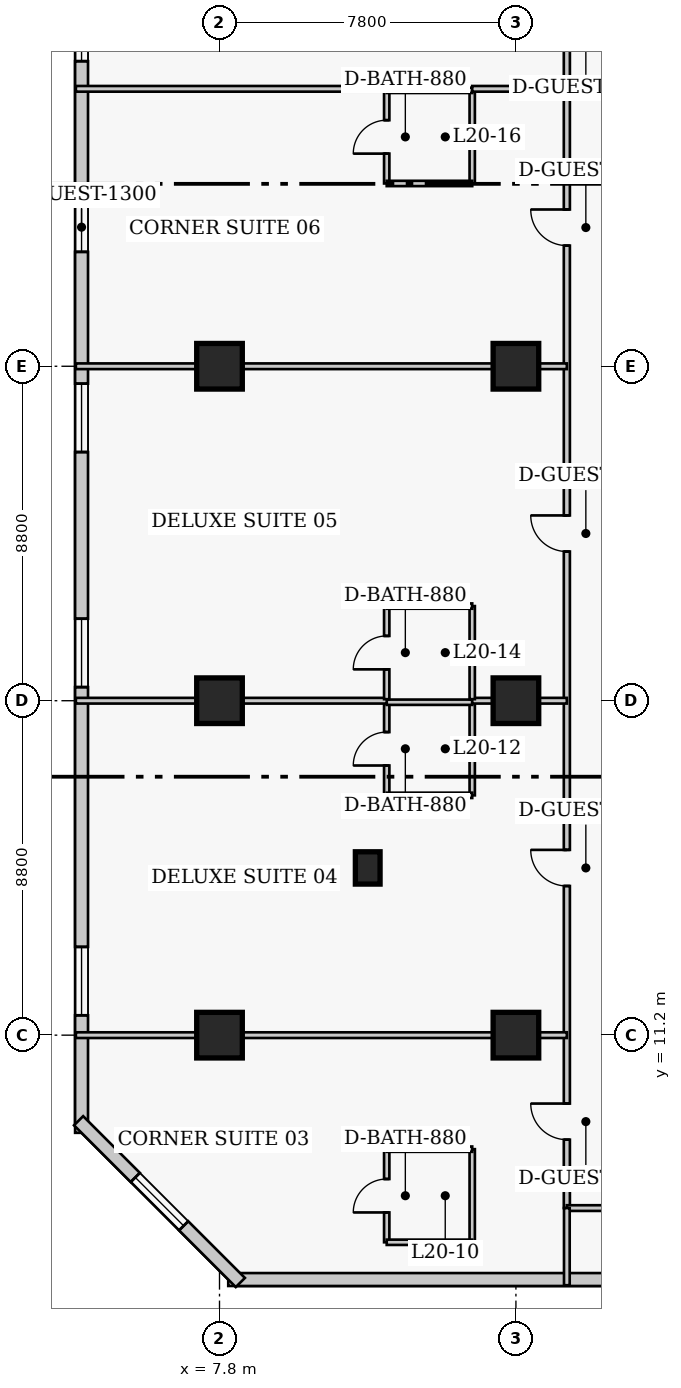
"""IFC4 building model, lengths in metres.
Left out: names, types, materials, properties, quantities, classifications, styles, units other than length and angle.
Written with IfcOpenShell. Run it as: python <this file> out.ifc"""

import sys

from ifc_helpers import new_model, si_unit, direction, frame, frame_2d, origin, origin_2d, place, context, subcontext, project, spatial, rectangle, extrude, element, fill, save


model = new_model("IFC4")
c1 = context("Model", 3, precision=1e-05, world=origin(), true_north=direction((0.0, 1.0)))
c2 = subcontext(c1, "Body", "Model", "MODEL_VIEW")
j1 = project(units=[si_unit("LENGTHUNIT", "METRE"), si_unit("PLANEANGLEUNIT", "RADIAN")], contexts=[c1])
p1 = place(None, origin())
s1 = spatial("IfcSite", under=j1, at=p1, CompositionType="ELEMENT")
p2 = place(p1, origin())
s2 = spatial("IfcBuilding", under=s1, at=p2, CompositionType="ELEMENT")
p3 = place(p2, frame((0.0, 0.0, 84.2)))
s3 = spatial("IfcBuildingStorey", under=s2, at=p3, CompositionType="ELEMENT", Elevation=84.2)
for number, where, z_axis, x_axis in (
    (1, (7.8, 11.2, 0.0), (0.0, 0.0, 1.0), (1.0, 0.0, 0.0)),
    (2, (7.8, 20.0, 0.0), (0.0, 0.0, 1.0), (1.0, 0.0, 0.0)),
    (3, (7.8, 28.8, 0.0), (0.0, 0.0, 1.0), (1.0, 0.0, 0.0)),
    (4, (15.6, 11.2, 0.0), (0.0, 0.0, 1.0), (1.0, 0.0, 0.0)),
    (5, (15.6, 20.0, 0.0), (0.0, 0.0, 1.0), (1.0, 0.0, 0.0)),
    (6, (15.6, 28.8, 0.0), (0.0, 0.0, 1.0), (1.0, 0.0, 0.0)),
):
    element("IfcColumn", number, at=place(p3, frame(where, z_axis=z_axis, x_axis=x_axis)), inside=s3, PredefinedType="COLUMN", context=c2, shape_type="SweptSolid", body=[
        extrude(rectangle(XDim=1.2, YDim=1.2, at=origin_2d()), origin(), (0.0, 0.0, 1.0), 3.8),
    ])
p4 = place(p3, frame((11.7, 15.6, 0.0), z_axis=(0.0, 0.0, 1.0), x_axis=(1.0, 0.0, 0.0)))
e7 = element("IfcColumn", 7, at=p4, inside=s3, PredefinedType="PILASTER", context=c2, shape_type="SweptSolid", body=[
    extrude(rectangle(XDim=0.65, YDim=0.85, at=origin_2d()), origin(), (0.0, 0.0, 1.0), 3.8),
])
p5 = place(p3, frame((8.03, 4.77, 0.0), z_axis=(0.0, 0.0, 1.0), x_axis=(1.0, 0.0, 0.0)))
e8 = element("IfcWall", 8, at=p5, inside=s3, PredefinedType="SOLIDWALL", context=c2, shape_type="SweptSolid", body=[
    extrude(rectangle(XDim=28.29, YDim=0.34, at=frame_2d((14.145, 0.0))), origin(), (0.0, 0.0, 1.0), 3.54),
])
p6 = place(p5, frame((12.595, 0.0, 0.85)))
e9 = element("IfcOpeningElement", 9, at=p6, cuts=e8, PredefinedType="OPENING", context=c2, shape_type="SweptSolid", body=[
    extrude(rectangle(XDim=1.8, YDim=1.8, at=frame_2d((0.9, 0.9))), frame((0.0, 0.18, 0.0), z_axis=(0.0, -1.0, 0.0), x_axis=(1.0, 0.0, 0.0)), (0.0, 0.0, 1.0), 0.36),
])
p7 = place(p3, frame((4.17, 40.57, 0.0), z_axis=(0.0, 0.0, 1.0), x_axis=(0.0, -1.0, 0.0)))
e10 = element("IfcWall", 10, at=p7, inside=s3, PredefinedType="SOLIDWALL", context=c2, shape_type="SweptSolid", body=[
    extrude(rectangle(XDim=31.94, YDim=0.34, at=frame_2d((15.97, 0.0))), origin(), (0.0, 0.0, 1.0), 3.54),
])
p8 = place(p7, frame((1.942, 0.0, 0.85)))
e11 = element("IfcOpeningElement", 11, at=p8, cuts=e10, PredefinedType="OPENING", context=c2, shape_type="SweptSolid", body=[
    extrude(rectangle(XDim=1.8, YDim=1.8, at=frame_2d((0.9, 0.9))), frame((0.0, 0.18, 0.0), z_axis=(0.0, -1.0, 0.0), x_axis=(1.0, 0.0, 0.0)), (0.0, 0.0, 1.0), 0.36),
])
p9 = place(p7, frame((12.228, 0.0, 0.85)))
e12 = element("IfcOpeningElement", 12, at=p9, cuts=e10, PredefinedType="OPENING", context=c2, shape_type="SweptSolid", body=[
    extrude(rectangle(XDim=1.8, YDim=1.8, at=frame_2d((0.9, 0.9))), frame((0.0, 0.18, 0.0), z_axis=(0.0, -1.0, 0.0), x_axis=(1.0, 0.0, 0.0)), (0.0, 0.0, 1.0), 0.36),
])
p10 = place(p7, frame((18.413, 0.0, 0.85)))
e13 = element("IfcOpeningElement", 13, at=p10, cuts=e10, PredefinedType="OPENING", context=c2, shape_type="SweptSolid", body=[
    extrude(rectangle(XDim=1.8, YDim=1.8, at=frame_2d((0.9, 0.9))), frame((0.0, 0.18, 0.0), z_axis=(0.0, -1.0, 0.0), x_axis=(1.0, 0.0, 0.0)), (0.0, 0.0, 1.0), 0.36),
])
p11 = place(p7, frame((27.048, 0.0, 0.85)))
e14 = element("IfcOpeningElement", 14, at=p11, cuts=e10, PredefinedType="OPENING", context=c2, shape_type="SweptSolid", body=[
    extrude(rectangle(XDim=1.8, YDim=1.8, at=frame_2d((0.9, 0.9))), frame((0.0, 0.18, 0.0), z_axis=(0.0, -1.0, 0.0), x_axis=(1.0, 0.0, 0.0)), (0.0, 0.0, 1.0), 0.36),
])
p12 = place(p7, frame((7.46, 0.0, 0.85)))
e15 = element("IfcOpeningElement", 15, at=p12, cuts=e10, PredefinedType="OPENING", context=c2, shape_type="SweptSolid", body=[
    extrude(rectangle(XDim=1.3, YDim=1.7, at=frame_2d((0.65, 0.85))), frame((0.0, 0.18, 0.0), z_axis=(0.0, -1.0, 0.0), x_axis=(1.0, 0.0, 0.0)), (0.0, 0.0, 1.0), 0.36),
])
p13 = place(p3, frame((4.092, 8.948, 0.0), z_axis=(0.0, 0.0, 1.0), x_axis=(0.707106781187, -0.707106781187, 0.0)))
e16 = element("IfcWall", 16, at=p13, inside=s3, PredefinedType="SOLIDWALL", context=c2, shape_type="SweptSolid", body=[
    extrude(rectangle(XDim=6.02, YDim=0.34, at=frame_2d((3.01, 0.0))), origin(), (0.0, 0.0, 1.0), 3.54),
])
p14 = place(p13, frame((2.11, 0.0, 0.85)))
e17 = element("IfcOpeningElement", 17, at=p14, cuts=e16, PredefinedType="OPENING", context=c2, shape_type="SweptSolid", body=[
    extrude(rectangle(XDim=1.8, YDim=1.8, at=frame_2d((0.9, 0.9))), frame((0.0, 0.18, 0.0), z_axis=(0.0, -1.0, 0.0), x_axis=(1.0, 0.0, 0.0)), (0.0, 0.0, 1.0), 0.36),
])
p15 = place(p3, frame((16.94, 6.65, 0.0), z_axis=(0.0, 0.0, 1.0), x_axis=(0.0, 1.0, 0.0)))
e18 = element("IfcWall", 18, at=p15, inside=s3, PredefinedType="PARTITIONING", context=c2, shape_type="SweptSolid", body=[
    extrude(rectangle(XDim=34.0, YDim=0.16, at=frame_2d((17.0, 0.0))), origin(), (0.0, 0.0, 1.0), 3.54),
])
p16 = place(p15, frame((1.8, 0.0, 0.0)))
e19 = element("IfcOpeningElement", 19, at=p16, cuts=e18, PredefinedType="OPENING", context=c2, shape_type="SweptSolid", body=[
    extrude(rectangle(XDim=0.95, YDim=2.1, at=frame_2d((0.475, 1.05))), frame((0.0, 0.09, 0.0), z_axis=(0.0, -1.0, 0.0), x_axis=(1.0, 0.0, 0.0)), (0.0, 0.0, 1.0), 0.18),
])
p17 = place(p15, frame((8.475, 0.0, 0.0)))
e20 = element("IfcOpeningElement", 20, at=p17, cuts=e18, PredefinedType="OPENING", context=c2, shape_type="SweptSolid", body=[
    extrude(rectangle(XDim=0.95, YDim=2.1, at=frame_2d((0.475, 1.05))), frame((0.0, 0.09, 0.0), z_axis=(0.0, -1.0, 0.0), x_axis=(1.0, 0.0, 0.0)), (0.0, 0.0, 1.0), 0.18),
])
p18 = place(p15, frame((17.275, 0.0, 0.0)))
e21 = element("IfcOpeningElement", 21, at=p18, cuts=e18, PredefinedType="OPENING", context=c2, shape_type="SweptSolid", body=[
    extrude(rectangle(XDim=0.95, YDim=2.1, at=frame_2d((0.475, 1.05))), frame((0.0, 0.09, 0.0), z_axis=(0.0, -1.0, 0.0), x_axis=(1.0, 0.0, 0.0)), (0.0, 0.0, 1.0), 0.18),
])
p19 = place(p15, frame((25.325, 0.0, 0.0)))
e22 = element("IfcOpeningElement", 22, at=p19, cuts=e18, PredefinedType="OPENING", context=c2, shape_type="SweptSolid", body=[
    extrude(rectangle(XDim=0.95, YDim=2.1, at=frame_2d((0.475, 1.05))), frame((0.0, 0.09, 0.0), z_axis=(0.0, -1.0, 0.0), x_axis=(1.0, 0.0, 0.0)), (0.0, 0.0, 1.0), 0.18),
])
p20 = place(p15, frame((32.56, 0.0, 0.0)))
e23 = element("IfcOpeningElement", 23, at=p20, cuts=e18, PredefinedType="OPENING", context=c2, shape_type="SweptSolid", body=[
    extrude(rectangle(XDim=1.0, YDim=2.15, at=frame_2d((0.5, 1.075))), frame((0.0, 0.09, 0.0), z_axis=(0.0, -1.0, 0.0), x_axis=(1.0, 0.0, 0.0)), (0.0, 0.0, 1.0), 0.18),
])
p21 = place(p3, frame((16.94, 6.65, 0.0), z_axis=(0.0, 0.0, 1.0), x_axis=(1.0, 0.0, 0.0)))
e24 = element("IfcWall", 24, at=p21, inside=s3, PredefinedType="PARTITIONING", context=c2, shape_type="SweptSolid", body=[
    extrude(rectangle(XDim=2.22, YDim=0.15, at=frame_2d((1.11, 0.0))), origin(), (0.0, 0.0, 1.0), 3.54),
])
p22 = place(p3, frame((16.94, 4.62, 0.0), z_axis=(0.0, 0.0, 1.0), x_axis=(0.0, 1.0, 0.0)))
e25 = element("IfcWall", 25, at=p22, inside=s3, PredefinedType="PARTITIONING", context=c2, shape_type="SweptSolid", body=[
    extrude(rectangle(XDim=2.03, YDim=0.15, at=frame_2d((1.015, 0.0))), origin(), (0.0, 0.0, 1.0), 3.54),
])
p23 = place(p3, frame((12.2, 5.75, 0.0), z_axis=(0.0, 0.0, 1.0), x_axis=(0.0, 1.0, 0.0)))
e26 = element("IfcWall", 26, at=p23, inside=s3, PredefinedType="PLUMBINGWALL", context=c2, shape_type="SweptSolid", body=[
    extrude(rectangle(XDim=2.45, YDim=0.14, at=frame_2d((1.225, 0.0))), origin(), (0.0, 0.0, 1.0), 3.54),
])
p24 = place(p23, frame((0.785, 0.0, 0.0)))
e27 = element("IfcOpeningElement", 27, at=p24, cuts=e26, PredefinedType="OPENING", context=c2, shape_type="SweptSolid", body=[
    extrude(rectangle(XDim=0.88, YDim=2.05, at=frame_2d((0.44, 1.025))), frame((0.0, 0.08, 0.0), z_axis=(0.0, -1.0, 0.0), x_axis=(1.0, 0.0, 0.0)), (0.0, 0.0, 1.0), 0.16),
])
p25 = place(p3, frame((14.45, 5.75, 0.0), z_axis=(0.0, 0.0, 1.0), x_axis=(0.0, 1.0, 0.0)))
e28 = element("IfcWall", 28, at=p25, inside=s3, PredefinedType="PLUMBINGWALL", context=c2, shape_type="SweptSolid", body=[
    extrude(rectangle(XDim=2.45, YDim=0.14, at=frame_2d((1.225, 0.0))), origin(), (0.0, 0.0, 1.0), 3.54),
])
for number, where, z_axis, x_axis in (
    (29, (12.2, 5.75, 0.0), (0.0, 0.0, 1.0), (1.0, 0.0, 0.0)),
    (30, (12.2, 8.2, 0.0), (0.0, 0.0, 1.0), (1.0, 0.0, 0.0)),
):
    element("IfcWall", number, at=place(p3, frame(where, z_axis=z_axis, x_axis=x_axis)), inside=s3, PredefinedType="PLUMBINGWALL", context=c2, shape_type="SweptSolid", body=[
        extrude(rectangle(XDim=2.25, YDim=0.14, at=frame_2d((1.125, 0.0))), origin(), (0.0, 0.0, 1.0), 3.54),
    ])
p26 = place(p3, frame((4.02, 11.2, 0.0), z_axis=(0.0, 0.0, 1.0), x_axis=(1.0, 0.0, 0.0)))
e31 = element("IfcWall", 31, at=p26, inside=s3, PredefinedType="PARTITIONING", context=c2, shape_type="SweptSolid", body=[
    extrude(rectangle(XDim=12.92, YDim=0.15, at=frame_2d((6.46, 0.0))), origin(), (0.0, 0.0, 1.0), 2.679),
])
p27 = place(p3, frame((12.2, 17.51, 0.0), z_axis=(0.0, 0.0, 1.0), x_axis=(0.0, 1.0, 0.0)))
e32 = element("IfcWall", 32, at=p27, inside=s3, PredefinedType="PLUMBINGWALL", context=c2, shape_type="SweptSolid", body=[
    extrude(rectangle(XDim=2.45, YDim=0.14, at=frame_2d((1.225, 0.0))), origin(), (0.0, 0.0, 1.0), 3.54),
])
p28 = place(p27, frame((0.785, 0.0, 0.0)))
e33 = element("IfcOpeningElement", 33, at=p28, cuts=e32, PredefinedType="OPENING", context=c2, shape_type="SweptSolid", body=[
    extrude(rectangle(XDim=0.88, YDim=2.05, at=frame_2d((0.44, 1.025))), frame((0.0, 0.08, 0.0), z_axis=(0.0, -1.0, 0.0), x_axis=(1.0, 0.0, 0.0)), (0.0, 0.0, 1.0), 0.16),
])
p29 = place(p3, frame((14.45, 17.51, 0.0), z_axis=(0.0, 0.0, 1.0), x_axis=(0.0, 1.0, 0.0)))
e34 = element("IfcWall", 34, at=p29, inside=s3, PredefinedType="PLUMBINGWALL", context=c2, shape_type="SweptSolid", body=[
    extrude(rectangle(XDim=2.45, YDim=0.14, at=frame_2d((1.225, 0.0))), origin(), (0.0, 0.0, 1.0), 3.54),
])
p30 = place(p3, frame((12.2, 17.51, 0.0), z_axis=(0.0, 0.0, 1.0), x_axis=(1.0, 0.0, 0.0)))
e35 = element("IfcWall", 35, at=p30, inside=s3, PredefinedType="PLUMBINGWALL", context=c2, shape_type="SweptSolid", body=[
    extrude(rectangle(XDim=2.25, YDim=0.14, at=frame_2d((1.125, 0.0))), origin(), (0.0, 0.0, 1.0), 3.54),
])
p31 = place(p3, frame((12.2, 19.96, 0.0), z_axis=(0.0, 0.0, 1.0), x_axis=(1.0, 0.0, 0.0)))
e36 = element("IfcWall", 36, at=p31, inside=s3, PredefinedType="PLUMBINGWALL", context=c2, shape_type="SweptSolid", body=[
    extrude(rectangle(XDim=2.25, YDim=0.14, at=frame_2d((1.125, 0.0))), origin(), (0.0, 0.0, 1.0), 2.679),
])
p32 = place(p3, frame((4.02, 20.0, 0.0), z_axis=(0.0, 0.0, 1.0), x_axis=(1.0, 0.0, 0.0)))
e37 = element("IfcWall", 37, at=p32, inside=s3, PredefinedType="PARTITIONING", context=c2, shape_type="SweptSolid", body=[
    extrude(rectangle(XDim=8.18, YDim=0.15, at=frame_2d((4.09, 0.0))), origin(), (0.0, 0.0, 1.0), 2.679),
])
p33 = place(p3, frame((14.45, 20.0, 0.0), z_axis=(0.0, 0.0, 1.0), x_axis=(1.0, 0.0, 0.0)))
e38 = element("IfcWall", 38, at=p33, inside=s3, PredefinedType="PARTITIONING", context=c2, shape_type="SweptSolid", body=[
    extrude(rectangle(XDim=2.49, YDim=0.15, at=frame_2d((1.245, 0.0))), origin(), (0.0, 0.0, 1.0), 2.679),
])
p34 = place(p3, frame((12.2, 20.04, 0.0), z_axis=(0.0, 0.0, 1.0), x_axis=(0.0, 1.0, 0.0)))
e39 = element("IfcWall", 39, at=p34, inside=s3, PredefinedType="PLUMBINGWALL", context=c2, shape_type="SweptSolid", body=[
    extrude(rectangle(XDim=2.45, YDim=0.14, at=frame_2d((1.225, 0.0))), origin(), (0.0, 0.0, 1.0), 3.54),
])
p35 = place(p34, frame((0.785, 0.0, 0.0)))
e40 = element("IfcOpeningElement", 40, at=p35, cuts=e39, PredefinedType="OPENING", context=c2, shape_type="SweptSolid", body=[
    extrude(rectangle(XDim=0.88, YDim=2.05, at=frame_2d((0.44, 1.025))), frame((0.0, 0.08, 0.0), z_axis=(0.0, -1.0, 0.0), x_axis=(1.0, 0.0, 0.0)), (0.0, 0.0, 1.0), 0.16),
])
p36 = place(p3, frame((14.45, 20.04, 0.0), z_axis=(0.0, 0.0, 1.0), x_axis=(0.0, 1.0, 0.0)))
e41 = element("IfcWall", 41, at=p36, inside=s3, PredefinedType="PLUMBINGWALL", context=c2, shape_type="SweptSolid", body=[
    extrude(rectangle(XDim=2.45, YDim=0.14, at=frame_2d((1.225, 0.0))), origin(), (0.0, 0.0, 1.0), 3.54),
])
p37 = place(p3, frame((12.2, 22.49, 0.0), z_axis=(0.0, 0.0, 1.0), x_axis=(1.0, 0.0, 0.0)))
e42 = element("IfcWall", 42, at=p37, inside=s3, PredefinedType="PLUMBINGWALL", context=c2, shape_type="SweptSolid", body=[
    extrude(rectangle(XDim=2.25, YDim=0.14, at=frame_2d((1.125, 0.0))), origin(), (0.0, 0.0, 1.0), 3.54),
])
p38 = place(p3, frame((4.02, 28.8, 0.0), z_axis=(0.0, 0.0, 1.0), x_axis=(1.0, 0.0, 0.0)))
e43 = element("IfcWall", 43, at=p38, inside=s3, PredefinedType="PARTITIONING", context=c2, shape_type="SweptSolid", body=[
    extrude(rectangle(XDim=12.92, YDim=0.15, at=frame_2d((6.46, 0.0))), origin(), (0.0, 0.0, 1.0), 2.679),
])
p39 = place(p3, frame((12.2, 33.61, 0.0), z_axis=(0.0, 0.0, 1.0), x_axis=(0.0, 1.0, 0.0)))
e44 = element("IfcWall", 44, at=p39, inside=s3, PredefinedType="PLUMBINGWALL", context=c2, shape_type="SweptSolid", body=[
    extrude(rectangle(XDim=2.45, YDim=0.14, at=frame_2d((1.225, 0.0))), origin(), (0.0, 0.0, 1.0), 3.54),
])
p40 = place(p39, frame((0.785, 0.0, 0.0)))
e45 = element("IfcOpeningElement", 45, at=p40, cuts=e44, PredefinedType="OPENING", context=c2, shape_type="SweptSolid", body=[
    extrude(rectangle(XDim=0.88, YDim=2.05, at=frame_2d((0.44, 1.025))), frame((0.0, 0.08, 0.0), z_axis=(0.0, -1.0, 0.0), x_axis=(1.0, 0.0, 0.0)), (0.0, 0.0, 1.0), 0.16),
])
p41 = place(p3, frame((14.45, 33.61, 0.0), z_axis=(0.0, 0.0, 1.0), x_axis=(0.0, 1.0, 0.0)))
e46 = element("IfcWall", 46, at=p41, inside=s3, PredefinedType="PLUMBINGWALL", context=c2, shape_type="SweptSolid", body=[
    extrude(rectangle(XDim=2.45, YDim=0.14, at=frame_2d((1.225, 0.0))), origin(), (0.0, 0.0, 1.0), 3.54),
])
for number, where, z_axis, x_axis in (
    (47, (12.2, 33.61, 0.0), (0.0, 0.0, 1.0), (1.0, 0.0, 0.0)),
    (48, (12.2, 36.06, 0.0), (0.0, 0.0, 1.0), (1.0, 0.0, 0.0)),
):
    element("IfcWall", number, at=place(p3, frame(where, z_axis=z_axis, x_axis=x_axis)), inside=s3, PredefinedType="PLUMBINGWALL", context=c2, shape_type="SweptSolid", body=[
        extrude(rectangle(XDim=2.25, YDim=0.14, at=frame_2d((1.125, 0.0))), origin(), (0.0, 0.0, 1.0), 3.54),
    ])
p42 = place(p3, frame((4.02, 36.1, 0.0), z_axis=(0.0, 0.0, 1.0), x_axis=(1.0, 0.0, 0.0)))
e49 = element("IfcWall", 49, at=p42, inside=s3, PredefinedType="PARTITIONING", context=c2, shape_type="SweptSolid", body=[
    extrude(rectangle(XDim=8.18, YDim=0.15, at=frame_2d((4.09, 0.0))), origin(), (0.0, 0.0, 1.0), 3.54),
])
p43 = place(p3, frame((14.45, 36.1, 0.0), z_axis=(0.0, 0.0, 1.0), x_axis=(1.0, 0.0, 0.0)))
e50 = element("IfcWall", 50, at=p43, inside=s3, PredefinedType="PARTITIONING", context=c2, shape_type="SweptSolid", body=[
    extrude(rectangle(XDim=2.49, YDim=0.15, at=frame_2d((1.245, 0.0))), origin(), (0.0, 0.0, 1.0), 3.54),
])
p44 = place(p8, origin())
e51 = element("IfcWindow", 51, at=p44, inside=s3, PartitioningType="SINGLE_PANEL", PredefinedType="WINDOW", context=c2, shape_type="SweptSolid", body=[
    extrude(rectangle(XDim=1.8, YDim=1.8, at=frame_2d((0.9, 0.9))), frame((0.0, 0.03, 0.0), z_axis=(0.0, -1.0, 0.0), x_axis=(1.0, 0.0, 0.0)), (0.0, 0.0, 1.0), 0.06),
])
fill(e11, e51)
p45 = place(p9, origin())
e52 = element("IfcWindow", 52, at=p45, inside=s3, PartitioningType="SINGLE_PANEL", PredefinedType="WINDOW", context=c2, shape_type="SweptSolid", body=[
    extrude(rectangle(XDim=1.8, YDim=1.8, at=frame_2d((0.9, 0.9))), frame((0.0, 0.03, 0.0), z_axis=(0.0, -1.0, 0.0), x_axis=(1.0, 0.0, 0.0)), (0.0, 0.0, 1.0), 0.06),
])
fill(e12, e52)
p46 = place(p10, origin())
e53 = element("IfcWindow", 53, at=p46, inside=s3, PartitioningType="SINGLE_PANEL", PredefinedType="WINDOW", context=c2, shape_type="SweptSolid", body=[
    extrude(rectangle(XDim=1.8, YDim=1.8, at=frame_2d((0.9, 0.9))), frame((0.0, 0.03, 0.0), z_axis=(0.0, -1.0, 0.0), x_axis=(1.0, 0.0, 0.0)), (0.0, 0.0, 1.0), 0.06),
])
fill(e13, e53)
p47 = place(p11, origin())
e54 = element("IfcWindow", 54, at=p47, inside=s3, PartitioningType="SINGLE_PANEL", PredefinedType="WINDOW", context=c2, shape_type="SweptSolid", body=[
    extrude(rectangle(XDim=1.8, YDim=1.8, at=frame_2d((0.9, 0.9))), frame((0.0, 0.03, 0.0), z_axis=(0.0, -1.0, 0.0), x_axis=(1.0, 0.0, 0.0)), (0.0, 0.0, 1.0), 0.06),
])
fill(e14, e54)
p48 = place(p14, origin())
e55 = element("IfcWindow", 55, at=p48, inside=s3, PartitioningType="SINGLE_PANEL", PredefinedType="WINDOW", context=c2, shape_type="SweptSolid", body=[
    extrude(rectangle(XDim=1.8, YDim=1.8, at=frame_2d((0.9, 0.9))), frame((0.0, 0.03, 0.0), z_axis=(0.0, -1.0, 0.0), x_axis=(1.0, 0.0, 0.0)), (0.0, 0.0, 1.0), 0.06),
])
fill(e17, e55)
p49 = place(p12, origin())
e56 = element("IfcWindow", 56, at=p49, inside=s3, PartitioningType="SINGLE_PANEL", PredefinedType="WINDOW", context=c2, shape_type="SweptSolid", body=[
    extrude(rectangle(XDim=1.3, YDim=1.7, at=frame_2d((0.65, 0.85))), frame((0.0, 0.03, 0.0), z_axis=(0.0, -1.0, 0.0), x_axis=(1.0, 0.0, 0.0)), (0.0, 0.0, 1.0), 0.06),
])
fill(e15, e56)
p50 = place(p24, origin())
e57 = element("IfcDoor", 57, at=p50, inside=s3, OperationType="SINGLE_SWING_LEFT", PredefinedType="DOOR", context=c2, shape_type="SweptSolid", body=[
    extrude(rectangle(XDim=0.88, YDim=2.05, at=frame_2d((0.44, 1.025))), frame((0.0, 0.025, 0.0), z_axis=(0.0, -1.0, 0.0), x_axis=(1.0, 0.0, 0.0)), (0.0, 0.0, 1.0), 0.05),
])
fill(e27, e57)
p51 = place(p16, origin())
e58 = element("IfcDoor", 58, at=p51, inside=s3, OperationType="SINGLE_SWING_RIGHT", PredefinedType="DOOR", context=c2, shape_type="SweptSolid", body=[
    extrude(rectangle(XDim=0.95, YDim=2.1, at=frame_2d((0.475, 1.05))), frame((0.0, 0.025, 0.0), z_axis=(0.0, -1.0, 0.0), x_axis=(1.0, 0.0, 0.0)), (0.0, 0.0, 1.0), 0.05),
])
fill(e19, e58)
p52 = place(p28, origin())
e59 = element("IfcDoor", 59, at=p52, inside=s3, OperationType="SINGLE_SWING_LEFT", PredefinedType="DOOR", context=c2, shape_type="SweptSolid", body=[
    extrude(rectangle(XDim=0.88, YDim=2.05, at=frame_2d((0.44, 1.025))), frame((0.0, 0.025, 0.0), z_axis=(0.0, -1.0, 0.0), x_axis=(1.0, 0.0, 0.0)), (0.0, 0.0, 1.0), 0.05),
])
fill(e33, e59)
p53 = place(p17, origin())
e60 = element("IfcDoor", 60, at=p53, inside=s3, OperationType="SINGLE_SWING_RIGHT", PredefinedType="DOOR", context=c2, shape_type="SweptSolid", body=[
    extrude(rectangle(XDim=0.95, YDim=2.1, at=frame_2d((0.475, 1.05))), frame((0.0, 0.025, 0.0), z_axis=(0.0, -1.0, 0.0), x_axis=(1.0, 0.0, 0.0)), (0.0, 0.0, 1.0), 0.05),
])
fill(e20, e60)
p54 = place(p35, origin())
e61 = element("IfcDoor", 61, at=p54, inside=s3, OperationType="SINGLE_SWING_LEFT", PredefinedType="DOOR", context=c2, shape_type="SweptSolid", body=[
    extrude(rectangle(XDim=0.88, YDim=2.05, at=frame_2d((0.44, 1.025))), frame((0.0, 0.025, 0.0), z_axis=(0.0, -1.0, 0.0), x_axis=(1.0, 0.0, 0.0)), (0.0, 0.0, 1.0), 0.05),
])
fill(e40, e61)
p55 = place(p18, origin())
e62 = element("IfcDoor", 62, at=p55, inside=s3, OperationType="SINGLE_SWING_RIGHT", PredefinedType="DOOR", context=c2, shape_type="SweptSolid", body=[
    extrude(rectangle(XDim=0.95, YDim=2.1, at=frame_2d((0.475, 1.05))), frame((0.0, 0.025, 0.0), z_axis=(0.0, -1.0, 0.0), x_axis=(1.0, 0.0, 0.0)), (0.0, 0.0, 1.0), 0.05),
])
fill(e21, e62)
p56 = place(p40, origin())
e63 = element("IfcDoor", 63, at=p56, inside=s3, OperationType="SINGLE_SWING_LEFT", PredefinedType="DOOR", context=c2, shape_type="SweptSolid", body=[
    extrude(rectangle(XDim=0.88, YDim=2.05, at=frame_2d((0.44, 1.025))), frame((0.0, 0.025, 0.0), z_axis=(0.0, -1.0, 0.0), x_axis=(1.0, 0.0, 0.0)), (0.0, 0.0, 1.0), 0.05),
])
fill(e45, e63)
p57 = place(p19, origin())
e64 = element("IfcDoor", 64, at=p57, inside=s3, OperationType="SINGLE_SWING_RIGHT", PredefinedType="DOOR", context=c2, shape_type="SweptSolid", body=[
    extrude(rectangle(XDim=0.95, YDim=2.1, at=frame_2d((0.475, 1.05))), frame((0.0, 0.025, 0.0), z_axis=(0.0, -1.0, 0.0), x_axis=(1.0, 0.0, 0.0)), (0.0, 0.0, 1.0), 0.05),
])
fill(e22, e64)
save(model, sys.argv[1])
